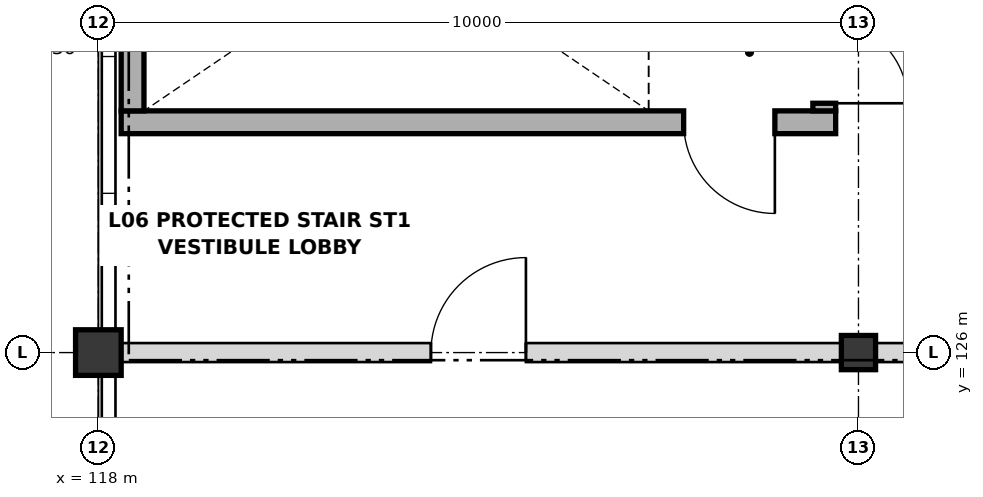
"""IFC4 building model, lengths in metres.
Left out: names, types, materials, properties, quantities, classifications, styles, units other than length and angle.
Written with IfcOpenShell. Run it as: python <this file> out.ifc"""

import sys

from ifc_helpers import new_model, si_unit, direction, frame, frame_2d, origin, origin_2d, place, context, subcontext, project, spatial, rectangle, extrude, element, fill, save


model = new_model("IFC4")
c1 = context("Model", 3, precision=1e-05, world=origin(), true_north=direction((0.0, 1.0)))
c2 = subcontext(c1, "Body", "Model", "MODEL_VIEW")
j1 = project(units=[si_unit("LENGTHUNIT", "METRE"), si_unit("PLANEANGLEUNIT", "RADIAN")], contexts=[c1])
p1 = place(None, origin())
s1 = spatial("IfcSite", under=j1, at=p1, CompositionType="ELEMENT")
p2 = place(p1, origin())
s2 = spatial("IfcBuilding", under=s1, at=p2, CompositionType="ELEMENT")
p3 = place(p2, frame((0.0, 0.0, 27.0)))
s3 = spatial("IfcBuildingStorey", under=s2, at=p3, CompositionType="ELEMENT", Elevation=27.0)
p4 = place(p3, frame((118.0, 126.0, 0.0), z_axis=(0.0, 0.0, 1.0), x_axis=(1.0, 0.0, 0.0)))
e1 = element("IfcColumn", 1, at=p4, inside=s3, PredefinedType="COLUMN", context=c2, shape_type="SweptSolid", body=[
    extrude(rectangle(XDim=0.6, YDim=0.6, at=origin_2d()), origin(), (0.0, 0.0, 1.0), 4.2),
])
p5 = place(p3, frame((128.0, 126.0, 0.0), z_axis=(0.0, 0.0, 1.0), x_axis=(1.0, 0.0, 0.0)))
e2 = element("IfcColumn", 2, at=p5, inside=s3, PredefinedType="COLUMN", context=c2, shape_type="SweptSolid", body=[
    extrude(rectangle(XDim=0.45, YDim=0.45, at=origin_2d()), origin(), (0.0, 0.0, 1.0), 4.2),
])
p6 = place(p3, frame((127.7, 129.03, 0.0), z_axis=(0.0, 0.0, 1.0), x_axis=(-1.0, 0.0, 0.0)))
e3 = element("IfcWall", 3, at=p6, inside=s3, PredefinedType="SHEAR", context=c2, shape_type="SweptSolid", body=[
    extrude(rectangle(XDim=9.4, YDim=0.3, at=frame_2d((4.7, 0.0))), origin(), (0.0, 0.0, 1.0), 3.98),
])
p7 = place(p6, frame((0.8, 0.0, 0.0)))
e4 = element("IfcOpeningElement", 4, at=p7, cuts=e3, PredefinedType="OPENING", context=c2, shape_type="SweptSolid", body=[
    extrude(rectangle(XDim=1.2, YDim=2.15, at=frame_2d((0.6, 1.075))), frame((0.0, 0.16, 0.0), z_axis=(0.0, -1.0, 0.0), x_axis=(1.0, 0.0, 0.0)), (0.0, 0.0, 1.0), 0.32),
])
p8 = place(p3, frame((127.55, 133.68, 0.0), z_axis=(0.0, 0.0, 1.0), x_axis=(0.0, -1.0, 0.0)))
e5 = element("IfcWall", 5, at=p8, inside=s3, PredefinedType="SHEAR", context=c2, shape_type="SweptSolid", body=[
    extrude(rectangle(XDim=4.5, YDim=0.3, at=frame_2d((2.25, 0.0))), origin(), (0.0, 0.0, 1.0), 3.98),
])
p9 = place(p8, frame((3.3, 0.0, 0.0)))
e6 = element("IfcOpeningElement", 6, at=p9, cuts=e5, PredefinedType="OPENING", context=c2, shape_type="SweptSolid", body=[
    extrude(rectangle(XDim=1.1, YDim=2.15, at=frame_2d((0.55, 1.075))), frame((0.0, 0.16, 0.0), z_axis=(0.0, -1.0, 0.0), x_axis=(1.0, 0.0, 0.0)), (0.0, 0.0, 1.0), 0.32),
])
p10 = place(p3, frame((118.45, 129.18, 0.0), z_axis=(0.0, 0.0, 1.0), x_axis=(0.0, 1.0, 0.0)))
e7 = element("IfcWall", 7, at=p10, inside=s3, PredefinedType="SHEAR", context=c2, shape_type="SweptSolid", body=[
    extrude(rectangle(XDim=4.5, YDim=0.3, at=frame_2d((2.25, 0.0))), origin(), (0.0, 0.0, 1.0), 3.98),
])
p11 = place(p3, frame((118.305, 126.0, 0.0), z_axis=(0.0, 0.0, 1.0), x_axis=(1.0, 0.0, 0.0)))
e8 = element("IfcWall", 8, at=p11, inside=s3, PredefinedType="PARTITIONING", context=c2, shape_type="SweptSolid", body=[
    extrude(rectangle(XDim=9.465, YDim=0.25, at=frame_2d((4.732, 0.0))), origin(), (0.0, 0.0, 1.0), 3.218),
])
p12 = place(p11, frame((4.07, 0.0, 0.0)))
e9 = element("IfcOpeningElement", 9, at=p12, cuts=e8, PredefinedType="OPENING", context=c2, shape_type="SweptSolid", body=[
    extrude(rectangle(XDim=1.25, YDim=2.15, at=frame_2d((0.625, 1.075))), frame((0.0, 0.135, 0.0), z_axis=(0.0, -1.0, 0.0), x_axis=(1.0, 0.0, 0.0)), (0.0, 0.0, 1.0), 0.27),
])
p13 = place(p3, frame((128.23, 126.0, 0.0), z_axis=(0.0, 0.0, 1.0), x_axis=(1.0, 0.0, 0.0)))
e10 = element("IfcWall", 10, at=p13, inside=s3, PredefinedType="PARTITIONING", context=c2, shape_type="SweptSolid", body=[
    extrude(rectangle(XDim=9.54, YDim=0.25, at=frame_2d((4.77, 0.0))), origin(), (0.0, 0.0, 1.0), 3.218),
])
p14 = place(p13, frame((1.945, 0.0, 0.0)))
e11 = element("IfcOpeningElement", 11, at=p14, cuts=e10, PredefinedType="OPENING", context=c2, shape_type="SweptSolid", body=[
    extrude(rectangle(XDim=1.25, YDim=2.15, at=frame_2d((0.625, 1.075))), frame((0.0, 0.135, 0.0), z_axis=(0.0, -1.0, 0.0), x_axis=(1.0, 0.0, 0.0)), (0.0, 0.0, 1.0), 0.27),
])
p15 = place(p13, frame((6.42, 0.0, 0.0)))
e12 = element("IfcOpeningElement", 12, at=p15, cuts=e10, PredefinedType="OPENING", context=c2, shape_type="SweptSolid", body=[
    extrude(rectangle(XDim=1.1, YDim=2.15, at=frame_2d((0.55, 1.075))), frame((0.0, 0.135, 0.0), z_axis=(0.0, -1.0, 0.0), x_axis=(1.0, 0.0, 0.0)), (0.0, 0.0, 1.0), 0.27),
])
p16 = place(p7, origin())
e13 = element("IfcDoor", 13, at=p16, inside=s3, OperationType="SINGLE_SWING_LEFT", PredefinedType="DOOR", context=c2, shape_type="SweptSolid", body=[
    extrude(rectangle(XDim=1.2, YDim=2.15, at=frame_2d((0.6, 1.075))), frame((0.0, 0.025, 0.0), z_axis=(0.0, -1.0, 0.0), x_axis=(1.0, 0.0, 0.0)), (0.0, 0.0, 1.0), 0.05),
])
fill(e4, e13)
p17 = place(p9, origin())
e14 = element("IfcDoor", 14, at=p17, inside=s3, OperationType="SINGLE_SWING_RIGHT", PredefinedType="DOOR", context=c2, shape_type="SweptSolid", body=[
    extrude(rectangle(XDim=1.1, YDim=2.15, at=frame_2d((0.55, 1.075))), frame((0.0, 0.025, 0.0), z_axis=(0.0, -1.0, 0.0), x_axis=(1.0, 0.0, 0.0)), (0.0, 0.0, 1.0), 0.05),
])
fill(e6, e14)
p18 = place(p12, origin())
e15 = element("IfcDoor", 15, at=p18, inside=s3, OperationType="SINGLE_SWING_RIGHT", PredefinedType="DOOR", context=c2, shape_type="SweptSolid", body=[
    extrude(rectangle(XDim=1.25, YDim=2.15, at=frame_2d((0.625, 1.075))), frame((0.0, 0.025, 0.0), z_axis=(0.0, -1.0, 0.0), x_axis=(1.0, 0.0, 0.0)), (0.0, 0.0, 1.0), 0.05),
])
fill(e9, e15)
save(model, sys.argv[1])
